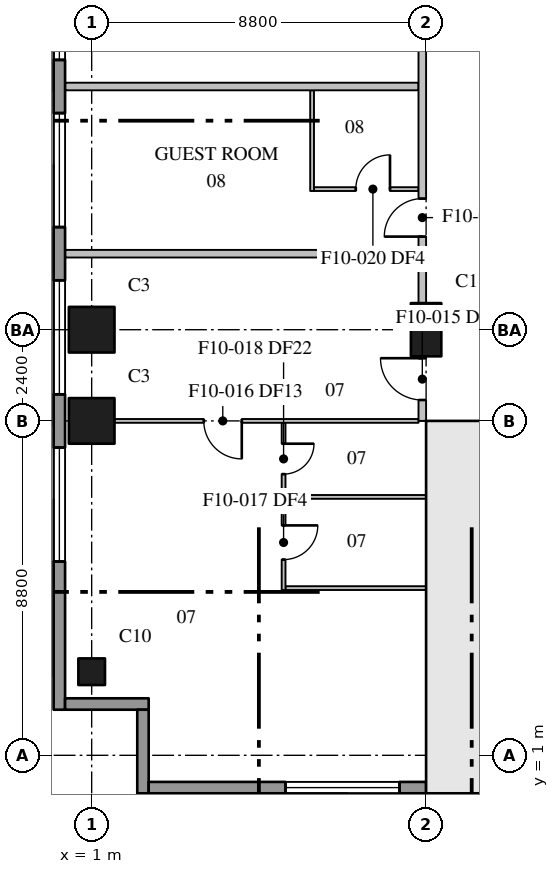
"""IFC4 building model, lengths in metres.
Left out: names, types, materials, properties, quantities, classifications, styles, units other than length and angle.
Written with IfcOpenShell. Run it as: python <this file> out.ifc"""

import sys

from ifc_helpers import new_model, si_unit, direction, frame, frame_2d, origin, origin_2d, place, context, subcontext, project, spatial, rectangle, extrude, element, fill, save


model = new_model("IFC4")
c1 = context("Model", 3, precision=1e-05, world=origin(), true_north=direction((0.0, 1.0)))
c2 = subcontext(c1, "Body", "Model", "MODEL_VIEW")
j1 = project(units=[si_unit("LENGTHUNIT", "METRE"), si_unit("PLANEANGLEUNIT", "RADIAN")], contexts=[c1])
p1 = place(None, origin())
s1 = spatial("IfcSite", under=j1, at=p1, CompositionType="ELEMENT")
p2 = place(p1, origin())
s2 = spatial("IfcBuilding", under=s1, at=p2, CompositionType="ELEMENT")
p3 = place(p2, frame((0.0, 0.0, 101.9)))
s3 = spatial("IfcBuildingStorey", under=s2, at=p3, CompositionType="ELEMENT", Elevation=101.9)
p4 = place(p3, frame((1.0, 3.2, 0.0), z_axis=(0.0, 0.0, 1.0), x_axis=(1.0, 0.0, 0.0)))
e1 = element("IfcColumn", 1, at=p4, inside=s3, PredefinedType="COLUMN", context=c2, shape_type="SweptSolid", body=[
    extrude(rectangle(XDim=0.7, YDim=0.7, at=origin_2d()), origin(), (0.0, 0.0, 1.0), 5.5),
])
for number, where, z_axis, x_axis in (
    (2, (1.0, 9.8, 0.0), (0.0, 0.0, 1.0), (1.0, 0.0, 0.0)),
    (3, (1.0, 12.2, 0.0), (0.0, 0.0, 1.0), (1.0, 0.0, 0.0)),
):
    element("IfcColumn", number, at=place(p3, frame(where, z_axis=z_axis, x_axis=x_axis)), inside=s3, PredefinedType="COLUMN", context=c2, shape_type="SweptSolid", body=[
        extrude(rectangle(XDim=1.2, YDim=1.2, at=origin_2d()), origin(), (0.0, 0.0, 1.0), 5.5),
    ])
p5 = place(p3, frame((9.8, 12.2, 0.0), z_axis=(0.0, 0.0, 1.0), x_axis=(0.0, 1.0, 0.0)))
e4 = element("IfcColumn", 4, at=p5, inside=s3, PredefinedType="COLUMN", context=c2, shape_type="SweptSolid", body=[
    extrude(rectangle(XDim=1.4, YDim=0.8, at=origin_2d()), origin(), (0.0, 0.0, 1.0), 5.5),
])
p6 = place(p3, frame((9.8, 0.8, 0.0), z_axis=(0.0, 0.0, 1.0), x_axis=(1.0, 0.0, 0.0)))
e5 = element("IfcWall", 5, at=p6, inside=s3, PredefinedType="SHEAR", context=c2, shape_type="SweptSolid", body=[
    extrude(rectangle(XDim=35.2, YDim=0.8, at=frame_2d((17.6, 0.0))), origin(), (0.0, 0.0, 1.0), 5.5),
])
p7 = place(p3, frame((10.6, 1.2, 0.0), z_axis=(0.0, 0.0, 1.0), x_axis=(0.0, 1.0, 0.0)))
e6 = element("IfcWall", 6, at=p7, inside=s3, PredefinedType="SHEAR", context=c2, shape_type="SweptSolid", body=[
    extrude(rectangle(XDim=8.6, YDim=0.8, at=frame_2d((4.3, 0.0))), origin(), (0.0, 0.0, 1.0), 5.5),
])
p8 = place(p3, frame((9.8, 9.6, 0.0), z_axis=(0.0, 0.0, 1.0), x_axis=(1.0, 0.0, 0.0)))
e7 = element("IfcWall", 7, at=p8, inside=s3, PredefinedType="SHEAR", context=c2, shape_type="SweptSolid", body=[
    extrude(rectangle(XDim=4.3, YDim=0.4, at=frame_2d((2.15, 0.0))), origin(), (0.0, 0.0, 1.0), 5.5),
])
p9 = place(p8, frame((2.05, 0.0, 0.0)))
e8 = element("IfcOpeningElement", 8, at=p9, cuts=e7, PredefinedType="OPENING", context=c2, shape_type="SweptSolid", body=[
    extrude(rectangle(XDim=1.2, YDim=2.1, at=frame_2d((0.6, 1.05))), frame((0.0, 0.21, 0.0), z_axis=(0.0, -1.0, 0.0), x_axis=(1.0, 0.0, 0.0)), (0.0, 0.0, 1.0), 0.42),
])
p10 = place(p3, frame((0.15, 78.7, 0.0), z_axis=(0.0, 0.0, 1.0), x_axis=(0.0, -1.0, 0.0)))
e9 = element("IfcWall", 9, at=p10, inside=s3, PredefinedType="STANDARD", context=c2, shape_type="SweptSolid", body=[
    extrude(rectangle(XDim=76.5, YDim=0.3, at=frame_2d((38.25, 0.0))), origin(), (0.0, 0.0, 1.0), 5.2),
])
p11 = place(p10, frame((3.6, 0.0, 0.75)))
e10 = element("IfcOpeningElement", 10, at=p11, cuts=e9, PredefinedType="OPENING", context=c2, shape_type="SweptSolid", body=[
    extrude(rectangle(XDim=3.0, YDim=2.3, at=frame_2d((1.5, 1.15))), frame((0.0, 0.16, 0.0), z_axis=(0.0, -1.0, 0.0), x_axis=(1.0, 0.0, 0.0)), (0.0, 0.0, 1.0), 0.32),
])
p12 = place(p10, frame((8.0, 0.0, 0.75)))
e11 = element("IfcOpeningElement", 11, at=p12, cuts=e9, PredefinedType="OPENING", context=c2, shape_type="SweptSolid", body=[
    extrude(rectangle(XDim=3.0, YDim=2.3, at=frame_2d((1.5, 1.15))), frame((0.0, 0.16, 0.0), z_axis=(0.0, -1.0, 0.0), x_axis=(1.0, 0.0, 0.0)), (0.0, 0.0, 1.0), 0.32),
])
p13 = place(p10, frame((12.4, 0.0, 0.75)))
e12 = element("IfcOpeningElement", 12, at=p13, cuts=e9, PredefinedType="OPENING", context=c2, shape_type="SweptSolid", body=[
    extrude(rectangle(XDim=3.0, YDim=2.3, at=frame_2d((1.5, 1.15))), frame((0.0, 0.16, 0.0), z_axis=(0.0, -1.0, 0.0), x_axis=(1.0, 0.0, 0.0)), (0.0, 0.0, 1.0), 0.32),
])
p14 = place(p10, frame((16.8, 0.0, 0.75)))
e13 = element("IfcOpeningElement", 13, at=p14, cuts=e9, PredefinedType="OPENING", context=c2, shape_type="SweptSolid", body=[
    extrude(rectangle(XDim=3.0, YDim=2.3, at=frame_2d((1.5, 1.15))), frame((0.0, 0.16, 0.0), z_axis=(0.0, -1.0, 0.0), x_axis=(1.0, 0.0, 0.0)), (0.0, 0.0, 1.0), 0.32),
])
p15 = place(p10, frame((21.2, 0.0, 0.75)))
e14 = element("IfcOpeningElement", 14, at=p15, cuts=e9, PredefinedType="OPENING", context=c2, shape_type="SweptSolid", body=[
    extrude(rectangle(XDim=3.0, YDim=2.3, at=frame_2d((1.5, 1.15))), frame((0.0, 0.16, 0.0), z_axis=(0.0, -1.0, 0.0), x_axis=(1.0, 0.0, 0.0)), (0.0, 0.0, 1.0), 0.32),
])
p16 = place(p10, frame((25.6, 0.0, 0.75)))
e15 = element("IfcOpeningElement", 15, at=p16, cuts=e9, PredefinedType="OPENING", context=c2, shape_type="SweptSolid", body=[
    extrude(rectangle(XDim=3.0, YDim=2.3, at=frame_2d((1.5, 1.15))), frame((0.0, 0.16, 0.0), z_axis=(0.0, -1.0, 0.0), x_axis=(1.0, 0.0, 0.0)), (0.0, 0.0, 1.0), 0.32),
])
p17 = place(p10, frame((30.0, 0.0, 0.75)))
e16 = element("IfcOpeningElement", 16, at=p17, cuts=e9, PredefinedType="OPENING", context=c2, shape_type="SweptSolid", body=[
    extrude(rectangle(XDim=3.0, YDim=2.3, at=frame_2d((1.5, 1.15))), frame((0.0, 0.16, 0.0), z_axis=(0.0, -1.0, 0.0), x_axis=(1.0, 0.0, 0.0)), (0.0, 0.0, 1.0), 0.32),
])
p18 = place(p10, frame((34.4, 0.0, 0.75)))
e17 = element("IfcOpeningElement", 17, at=p18, cuts=e9, PredefinedType="OPENING", context=c2, shape_type="SweptSolid", body=[
    extrude(rectangle(XDim=3.0, YDim=2.3, at=frame_2d((1.5, 1.15))), frame((0.0, 0.16, 0.0), z_axis=(0.0, -1.0, 0.0), x_axis=(1.0, 0.0, 0.0)), (0.0, 0.0, 1.0), 0.32),
])
p19 = place(p10, frame((38.8, 0.0, 0.75)))
e18 = element("IfcOpeningElement", 18, at=p19, cuts=e9, PredefinedType="OPENING", context=c2, shape_type="SweptSolid", body=[
    extrude(rectangle(XDim=3.0, YDim=2.3, at=frame_2d((1.5, 1.15))), frame((0.0, 0.16, 0.0), z_axis=(0.0, -1.0, 0.0), x_axis=(1.0, 0.0, 0.0)), (0.0, 0.0, 1.0), 0.32),
])
p20 = place(p10, frame((43.2, 0.0, 0.75)))
e19 = element("IfcOpeningElement", 19, at=p20, cuts=e9, PredefinedType="OPENING", context=c2, shape_type="SweptSolid", body=[
    extrude(rectangle(XDim=3.0, YDim=2.3, at=frame_2d((1.5, 1.15))), frame((0.0, 0.16, 0.0), z_axis=(0.0, -1.0, 0.0), x_axis=(1.0, 0.0, 0.0)), (0.0, 0.0, 1.0), 0.32),
])
p21 = place(p10, frame((47.6, 0.0, 0.75)))
e20 = element("IfcOpeningElement", 20, at=p21, cuts=e9, PredefinedType="OPENING", context=c2, shape_type="SweptSolid", body=[
    extrude(rectangle(XDim=3.0, YDim=2.3, at=frame_2d((1.5, 1.15))), frame((0.0, 0.16, 0.0), z_axis=(0.0, -1.0, 0.0), x_axis=(1.0, 0.0, 0.0)), (0.0, 0.0, 1.0), 0.32),
])
p22 = place(p10, frame((52.0, 0.0, 0.75)))
e21 = element("IfcOpeningElement", 21, at=p22, cuts=e9, PredefinedType="OPENING", context=c2, shape_type="SweptSolid", body=[
    extrude(rectangle(XDim=3.0, YDim=2.3, at=frame_2d((1.5, 1.15))), frame((0.0, 0.16, 0.0), z_axis=(0.0, -1.0, 0.0), x_axis=(1.0, 0.0, 0.0)), (0.0, 0.0, 1.0), 0.32),
])
p23 = place(p10, frame((56.4, 0.0, 0.75)))
e22 = element("IfcOpeningElement", 22, at=p23, cuts=e9, PredefinedType="OPENING", context=c2, shape_type="SweptSolid", body=[
    extrude(rectangle(XDim=3.0, YDim=2.3, at=frame_2d((1.5, 1.15))), frame((0.0, 0.16, 0.0), z_axis=(0.0, -1.0, 0.0), x_axis=(1.0, 0.0, 0.0)), (0.0, 0.0, 1.0), 0.32),
])
p24 = place(p10, frame((60.8, 0.0, 0.75)))
e23 = element("IfcOpeningElement", 23, at=p24, cuts=e9, PredefinedType="OPENING", context=c2, shape_type="SweptSolid", body=[
    extrude(rectangle(XDim=3.0, YDim=2.3, at=frame_2d((1.5, 1.15))), frame((0.0, 0.16, 0.0), z_axis=(0.0, -1.0, 0.0), x_axis=(1.0, 0.0, 0.0)), (0.0, 0.0, 1.0), 0.32),
])
p25 = place(p10, frame((65.2, 0.0, 0.75)))
e24 = element("IfcOpeningElement", 24, at=p25, cuts=e9, PredefinedType="OPENING", context=c2, shape_type="SweptSolid", body=[
    extrude(rectangle(XDim=3.0, YDim=2.3, at=frame_2d((1.5, 1.15))), frame((0.0, 0.16, 0.0), z_axis=(0.0, -1.0, 0.0), x_axis=(1.0, 0.0, 0.0)), (0.0, 0.0, 1.0), 0.32),
])
p26 = place(p10, frame((69.6, 0.0, 0.75)))
e25 = element("IfcOpeningElement", 25, at=p26, cuts=e9, PredefinedType="OPENING", context=c2, shape_type="SweptSolid", body=[
    extrude(rectangle(XDim=3.0, YDim=2.3, at=frame_2d((1.5, 1.15))), frame((0.0, 0.16, 0.0), z_axis=(0.0, -1.0, 0.0), x_axis=(1.0, 0.0, 0.0)), (0.0, 0.0, 1.0), 0.32),
])
for number, where, z_axis, x_axis in (
    (26, (0.3, 2.35, 0.0), (0.0, 0.0, 1.0), (1.0, 0.0, 0.0)),
    (27, (2.35, 2.2, 0.0), (0.0, 0.0, 1.0), (0.0, -1.0, 0.0)),
):
    element("IfcWall", number, at=place(p3, frame(where, z_axis=z_axis, x_axis=x_axis)), inside=s3, PredefinedType="STANDARD", context=c2, shape_type="SweptSolid", body=[
        extrude(rectangle(XDim=2.2, YDim=0.3, at=frame_2d((1.1, 0.0))), origin(), (0.0, 0.0, 1.0), 5.2),
    ])
p27 = place(p3, frame((2.5, 0.15, 0.0), z_axis=(0.0, 0.0, 1.0), x_axis=(1.0, 0.0, 0.0)))
e28 = element("IfcWall", 28, at=p27, inside=s3, PredefinedType="STANDARD", context=c2, shape_type="SweptSolid", body=[
    extrude(rectangle(XDim=7.3, YDim=0.3, at=frame_2d((3.65, 0.0))), origin(), (0.0, 0.0, 1.0), 5.2),
])
p28 = place(p27, frame((3.6, 0.0, 0.75)))
e29 = element("IfcOpeningElement", 29, at=p28, cuts=e28, PredefinedType="OPENING", context=c2, shape_type="SweptSolid", body=[
    extrude(rectangle(XDim=3.0, YDim=2.3, at=frame_2d((1.5, 1.15))), frame((0.0, 0.16, 0.0), z_axis=(0.0, -1.0, 0.0), x_axis=(1.0, 0.0, 0.0)), (0.0, 0.0, 1.0), 0.32),
])
p29 = place(p3, frame((9.7, 9.8, 0.0), z_axis=(0.0, 0.0, 1.0), x_axis=(0.0, 1.0, 0.0)))
e30 = element("IfcWall", 30, at=p29, inside=s3, PredefinedType="PARTITIONING", context=c2, shape_type="SweptSolid", body=[
    extrude(rectangle(XDim=1.7, YDim=0.2, at=frame_2d((0.85, 0.0))), origin(), (0.0, 0.0, 1.0), 5.2),
])
p30 = place(p29, frame((0.55, 0.0, 0.0)))
e31 = element("IfcOpeningElement", 31, at=p30, cuts=e30, PredefinedType="OPENING", context=c2, shape_type="SweptSolid", body=[
    extrude(rectangle(XDim=1.1, YDim=2.1, at=frame_2d((0.55, 1.05))), frame((0.0, 0.11, 0.0), z_axis=(0.0, -1.0, 0.0), x_axis=(1.0, 0.0, 0.0)), (0.0, 0.0, 1.0), 0.22),
])
p31 = place(p3, frame((9.7, 12.9, 0.0), z_axis=(0.0, 0.0, 1.0), x_axis=(0.0, 1.0, 0.0)))
e32 = element("IfcWall", 32, at=p31, inside=s3, PredefinedType="PARTITIONING", context=c2, shape_type="SweptSolid", body=[
    extrude(rectangle(XDim=7.5, YDim=0.2, at=frame_2d((3.75, 0.0))), origin(), (0.0, 0.0, 1.0), 5.2),
])
p32 = place(p31, frame((1.75, 0.0, 0.0)))
e33 = element("IfcOpeningElement", 33, at=p32, cuts=e32, PredefinedType="OPENING", context=c2, shape_type="SweptSolid", body=[
    extrude(rectangle(XDim=1.0, YDim=2.1, at=frame_2d((0.5, 1.05))), frame((0.0, 0.11, 0.0), z_axis=(0.0, -1.0, 0.0), x_axis=(1.0, 0.0, 0.0)), (0.0, 0.0, 1.0), 0.22),
])
for number, where, z_axis, x_axis in (
    (34, (0.31, 14.2, 0.0), (0.0, 0.0, 1.0), (1.0, 0.0, 0.0)),
    (35, (0.31, 18.6, 0.0), (0.0, 0.0, 1.0), (1.0, 0.0, 0.0)),
):
    element("IfcWall", number, at=place(p3, frame(where, z_axis=z_axis, x_axis=x_axis)), inside=s3, PredefinedType="PARTITIONING", context=c2, shape_type="SweptSolid", body=[
        extrude(rectangle(XDim=9.29, YDim=0.2, at=frame_2d((4.645, 0.0))), origin(), (0.0, 0.0, 1.0), 5.2),
    ])
p33 = place(p3, frame((6.1, 5.4, 0.0), z_axis=(0.0, 0.0, 1.0), x_axis=(1.0, 0.0, 0.0)))
e36 = element("IfcWall", 36, at=p33, inside=s3, PredefinedType="PARTITIONING", context=c2, shape_type="SweptSolid", body=[
    extrude(rectangle(XDim=3.7, YDim=0.1, at=frame_2d((1.85, 0.0))), origin(), (0.0, 0.0, 1.0), 5.2),
])
p34 = place(p3, frame((6.05, 9.75, 0.0), z_axis=(0.0, 0.0, 1.0), x_axis=(0.0, -1.0, 0.0)))
e37 = element("IfcWall", 37, at=p34, inside=s3, PredefinedType="PARTITIONING", context=c2, shape_type="SweptSolid", body=[
    extrude(rectangle(XDim=4.4, YDim=0.1, at=frame_2d((2.2, 0.0))), origin(), (0.0, 0.0, 1.0), 5.2),
])
p35 = place(p34, frame((2.7, 0.0, 0.0)))
e38 = element("IfcOpeningElement", 38, at=p35, cuts=e37, PredefinedType="OPENING", context=c2, shape_type="SweptSolid", body=[
    extrude(rectangle(XDim=0.9, YDim=2.1, at=frame_2d((0.45, 1.05))), frame((0.0, 0.06, 0.0), z_axis=(0.0, -1.0, 0.0), x_axis=(1.0, 0.0, 0.0)), (0.0, 0.0, 1.0), 0.12),
])
p36 = place(p34, frame((0.55, 0.0, 0.0)))
e39 = element("IfcOpeningElement", 39, at=p36, cuts=e37, PredefinedType="OPENING", context=c2, shape_type="SweptSolid", body=[
    extrude(rectangle(XDim=0.8, YDim=2.1, at=frame_2d((0.4, 1.05))), frame((0.0, 0.06, 0.0), z_axis=(0.0, -1.0, 0.0), x_axis=(1.0, 0.0, 0.0)), (0.0, 0.0, 1.0), 0.12),
])
p37 = place(p3, frame((9.6, 9.8, 0.0), z_axis=(0.0, 0.0, 1.0), x_axis=(-1.0, 0.0, 0.0)))
e40 = element("IfcWall", 40, at=p37, inside=s3, PredefinedType="PARTITIONING", context=c2, shape_type="SweptSolid", body=[
    extrude(rectangle(XDim=8.0, YDim=0.1, at=frame_2d((4.0, 0.0))), origin(), (0.0, 0.0, 1.0), 5.2),
])
p38 = place(p37, frame((4.65, 0.0, 0.0)))
e41 = element("IfcOpeningElement", 41, at=p38, cuts=e40, PredefinedType="OPENING", context=c2, shape_type="SweptSolid", body=[
    extrude(rectangle(XDim=1.0, YDim=2.1, at=frame_2d((0.5, 1.05))), frame((0.0, 0.06, 0.0), z_axis=(0.0, -1.0, 0.0), x_axis=(1.0, 0.0, 0.0)), (0.0, 0.0, 1.0), 0.12),
])
p39 = place(p3, frame((6.1, 7.8, 0.0), z_axis=(0.0, 0.0, 1.0), x_axis=(1.0, 0.0, 0.0)))
e42 = element("IfcWall", 42, at=p39, inside=s3, PredefinedType="PARTITIONING", context=c2, shape_type="SweptSolid", body=[
    extrude(rectangle(XDim=3.7, YDim=0.1, at=frame_2d((1.85, 0.0))), origin(), (0.0, 0.0, 1.0), 5.2),
])
p40 = place(p3, frame((6.8, 15.85, 0.0), z_axis=(0.0, 0.0, 1.0), x_axis=(0.0, 1.0, 0.0)))
e43 = element("IfcWall", 43, at=p40, inside=s3, PredefinedType="PARTITIONING", context=c2, shape_type="SweptSolid", body=[
    extrude(rectangle(XDim=2.65, YDim=0.1, at=frame_2d((1.325, 0.0))), origin(), (0.0, 0.0, 1.0), 5.2),
])
p41 = place(p3, frame((6.85, 15.9, 0.0), z_axis=(0.0, 0.0, 1.0), x_axis=(1.0, 0.0, 0.0)))
e44 = element("IfcWall", 44, at=p41, inside=s3, PredefinedType="PARTITIONING", context=c2, shape_type="SweptSolid", body=[
    extrude(rectangle(XDim=2.75, YDim=0.1, at=frame_2d((1.375, 0.0))), origin(), (0.0, 0.0, 1.0), 5.2),
])
p42 = place(p41, frame((1.1, 0.0, 0.0)))
e45 = element("IfcOpeningElement", 45, at=p42, cuts=e44, PredefinedType="OPENING", context=c2, shape_type="SweptSolid", body=[
    extrude(rectangle(XDim=0.9, YDim=2.1, at=frame_2d((0.45, 1.05))), frame((0.0, 0.06, 0.0), z_axis=(0.0, -1.0, 0.0), x_axis=(1.0, 0.0, 0.0)), (0.0, 0.0, 1.0), 0.12),
])
p43 = place(p23, origin())
e46 = element("IfcWindow", 46, at=p43, inside=s3, PartitioningType="SINGLE_PANEL", PredefinedType="WINDOW", context=c2, shape_type="SweptSolid", body=[
    extrude(rectangle(XDim=3.0, YDim=2.3, at=frame_2d((1.5, 1.15))), frame((0.0, 0.03, 0.0), z_axis=(0.0, -1.0, 0.0), x_axis=(1.0, 0.0, 0.0)), (0.0, 0.0, 1.0), 0.06),
])
fill(e22, e46)
p44 = place(p24, origin())
e47 = element("IfcWindow", 47, at=p44, inside=s3, PartitioningType="SINGLE_PANEL", PredefinedType="WINDOW", context=c2, shape_type="SweptSolid", body=[
    extrude(rectangle(XDim=3.0, YDim=2.3, at=frame_2d((1.5, 1.15))), frame((0.0, 0.03, 0.0), z_axis=(0.0, -1.0, 0.0), x_axis=(1.0, 0.0, 0.0)), (0.0, 0.0, 1.0), 0.06),
])
fill(e23, e47)
p45 = place(p25, origin())
e48 = element("IfcWindow", 48, at=p45, inside=s3, PartitioningType="SINGLE_PANEL", PredefinedType="WINDOW", context=c2, shape_type="SweptSolid", body=[
    extrude(rectangle(XDim=3.0, YDim=2.3, at=frame_2d((1.5, 1.15))), frame((0.0, 0.03, 0.0), z_axis=(0.0, -1.0, 0.0), x_axis=(1.0, 0.0, 0.0)), (0.0, 0.0, 1.0), 0.06),
])
fill(e24, e48)
p46 = place(p26, origin())
e49 = element("IfcWindow", 49, at=p46, inside=s3, PartitioningType="SINGLE_PANEL", PredefinedType="WINDOW", context=c2, shape_type="SweptSolid", body=[
    extrude(rectangle(XDim=3.0, YDim=2.3, at=frame_2d((1.5, 1.15))), frame((0.0, 0.03, 0.0), z_axis=(0.0, -1.0, 0.0), x_axis=(1.0, 0.0, 0.0)), (0.0, 0.0, 1.0), 0.06),
])
fill(e25, e49)
p47 = place(p28, origin())
e50 = element("IfcWindow", 50, at=p47, inside=s3, PartitioningType="SINGLE_PANEL", PredefinedType="WINDOW", context=c2, shape_type="SweptSolid", body=[
    extrude(rectangle(XDim=3.0, YDim=2.3, at=frame_2d((1.5, 1.15))), frame((0.0, 0.03, 0.0), z_axis=(0.0, -1.0, 0.0), x_axis=(1.0, 0.0, 0.0)), (0.0, 0.0, 1.0), 0.06),
])
fill(e29, e50)
p48 = place(p30, origin())
e51 = element("IfcDoor", 51, at=p48, inside=s3, OperationType="SINGLE_SWING_RIGHT", PredefinedType="DOOR", context=c2, shape_type="SweptSolid", body=[
    extrude(rectangle(XDim=1.1, YDim=2.1, at=frame_2d((0.55, 1.05))), frame((0.0, 0.025, 0.0), z_axis=(0.0, -1.0, 0.0), x_axis=(1.0, 0.0, 0.0)), (0.0, 0.0, 1.0), 0.05),
])
fill(e31, e51)
p49 = place(p38, origin())
e52 = element("IfcDoor", 52, at=p49, inside=s3, OperationType="SINGLE_SWING_LEFT", PredefinedType="DOOR", context=c2, shape_type="SweptSolid", body=[
    extrude(rectangle(XDim=1.0, YDim=2.1, at=frame_2d((0.5, 1.05))), frame((0.0, 0.025, 0.0), z_axis=(0.0, -1.0, 0.0), x_axis=(1.0, 0.0, 0.0)), (0.0, 0.0, 1.0), 0.05),
])
fill(e41, e52)
p50 = place(p35, origin())
e53 = element("IfcDoor", 53, at=p50, inside=s3, OperationType="SINGLE_SWING_LEFT", PredefinedType="DOOR", context=c2, shape_type="SweptSolid", body=[
    extrude(rectangle(XDim=0.9, YDim=2.1, at=frame_2d((0.45, 1.05))), frame((0.0, 0.025, 0.0), z_axis=(0.0, -1.0, 0.0), x_axis=(1.0, 0.0, 0.0)), (0.0, 0.0, 1.0), 0.05),
])
fill(e38, e53)
p51 = place(p36, origin())
e54 = element("IfcDoor", 54, at=p51, inside=s3, OperationType="SINGLE_SWING_LEFT", PredefinedType="DOOR", context=c2, shape_type="SweptSolid", body=[
    extrude(rectangle(XDim=0.8, YDim=2.1, at=frame_2d((0.4, 1.05))), frame((0.0, 0.025, 0.0), z_axis=(0.0, -1.0, 0.0), x_axis=(1.0, 0.0, 0.0)), (0.0, 0.0, 1.0), 0.05),
])
fill(e39, e54)
p52 = place(p32, origin())
e55 = element("IfcDoor", 55, at=p52, inside=s3, OperationType="SINGLE_SWING_LEFT", PredefinedType="DOOR", context=c2, shape_type="SweptSolid", body=[
    extrude(rectangle(XDim=1.0, YDim=2.1, at=frame_2d((0.5, 1.05))), frame((0.0, 0.025, 0.0), z_axis=(0.0, -1.0, 0.0), x_axis=(1.0, 0.0, 0.0)), (0.0, 0.0, 1.0), 0.05),
])
fill(e33, e55)
p53 = place(p42, origin())
e56 = element("IfcDoor", 56, at=p53, inside=s3, OperationType="SINGLE_SWING_RIGHT", PredefinedType="DOOR", context=c2, shape_type="SweptSolid", body=[
    extrude(rectangle(XDim=0.9, YDim=2.1, at=frame_2d((0.45, 1.05))), frame((0.0, 0.025, 0.0), z_axis=(0.0, -1.0, 0.0), x_axis=(1.0, 0.0, 0.0)), (0.0, 0.0, 1.0), 0.05),
])
fill(e45, e56)
save(model, sys.argv[1])
